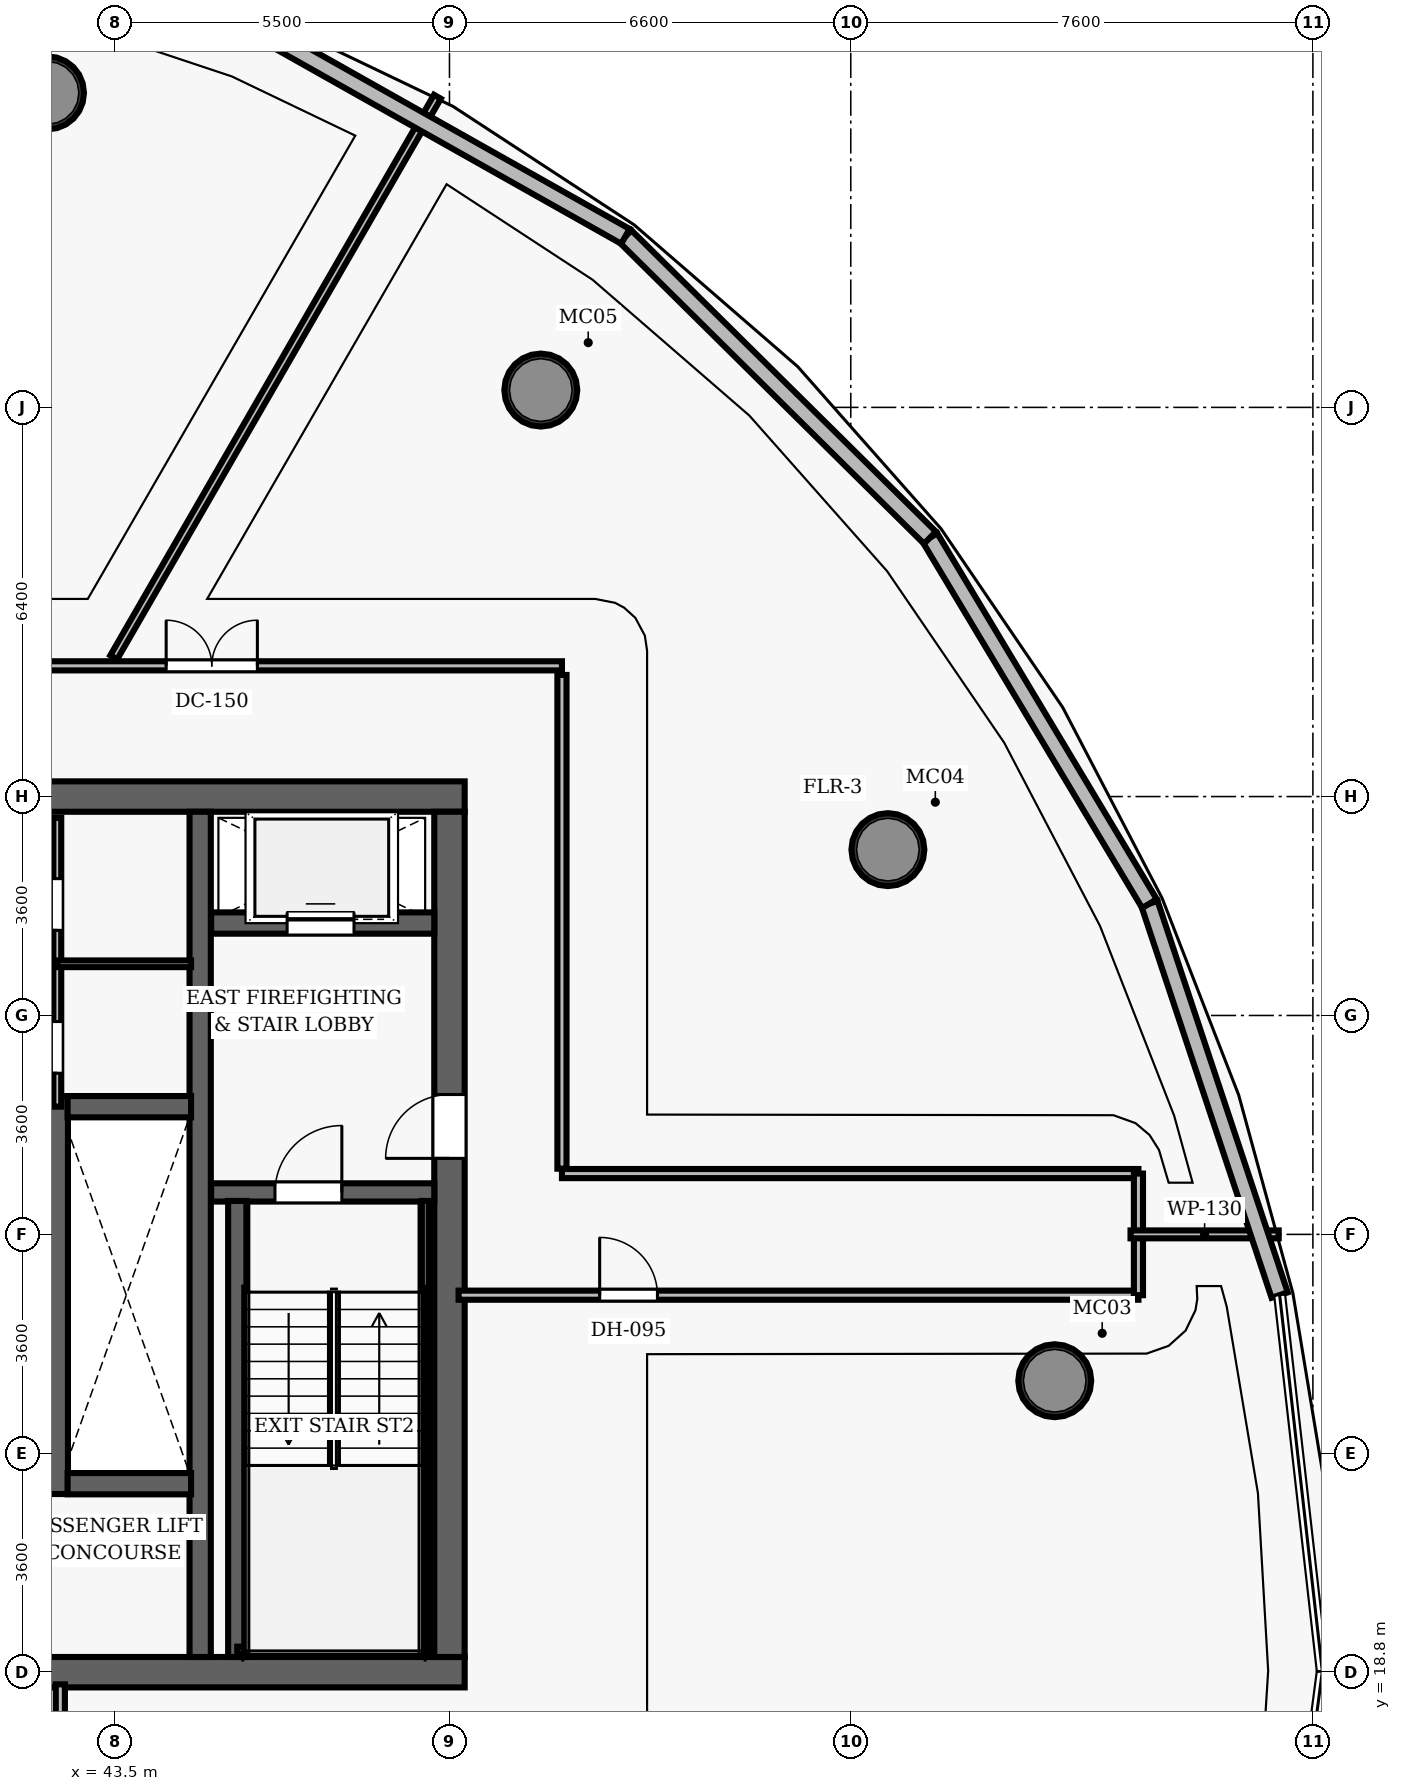
"""IFC4 building model, lengths in metres.
Left out: names, types, materials, properties, quantities, classifications, styles, units other than length and angle.
Written with IfcOpenShell. Run it as: python <this file> out.ifc"""

import sys

from ifc_helpers import new_model, si_unit, direction, frame, frame_2d, origin, origin_2d, place, context, subcontext, project, spatial, rectangle, hollow_circle, extrude, element, fill, save


model = new_model("IFC4")
c1 = context("Model", 3, precision=1e-05, world=origin(), true_north=direction((0.0, 1.0)))
c2 = subcontext(c1, "Body", "Model", "MODEL_VIEW")
j1 = project(units=[si_unit("LENGTHUNIT", "METRE"), si_unit("PLANEANGLEUNIT", "RADIAN")], contexts=[c1])
p1 = place(None, origin())
s1 = spatial("IfcSite", under=j1, at=p1, CompositionType="ELEMENT")
p2 = place(p1, origin())
s2 = spatial("IfcBuilding", under=s1, at=p2, CompositionType="ELEMENT")
p3 = place(p2, frame((0.0, 0.0, 178.9)))
s3 = spatial("IfcBuildingStorey", under=s2, at=p3, CompositionType="ELEMENT", Elevation=178.9)
p4 = place(p3, frame((26.75, 18.8, 0.0), z_axis=(0.0, 0.0, 1.0), x_axis=(1.0, 0.0, 0.0)))
e1 = element("IfcWall", 1, at=p4, inside=s3, PredefinedType="SHEAR", context=c2, shape_type="SweptSolid", body=[
    extrude(rectangle(XDim=22.5, YDim=0.5, at=frame_2d((11.25, 0.0))), origin(), (0.0, 0.0, 1.0), 3.85),
])
p5 = place(p4, frame((14.47, 0.0, 0.0)))
e2 = element("IfcOpeningElement", 2, at=p5, cuts=e1, PredefinedType="OPENING", context=c2, shape_type="SweptSolid", body=[
    extrude(rectangle(XDim=1.05, YDim=2.15, at=frame_2d((0.525, 1.075))), frame((0.0, 0.26, 0.0), z_axis=(0.0, -1.0, 0.0), x_axis=(1.0, 0.0, 0.0)), (0.0, 0.0, 1.0), 0.52),
])
p6 = place(p3, frame((26.75, 33.2, 0.0), z_axis=(0.0, 0.0, 1.0), x_axis=(1.0, 0.0, 0.0)))
e3 = element("IfcWall", 3, at=p6, inside=s3, PredefinedType="SHEAR", context=c2, shape_type="SweptSolid", body=[
    extrude(rectangle(XDim=22.5, YDim=0.5, at=frame_2d((11.25, 0.0))), origin(), (0.0, 0.0, 1.0), 3.85),
])
p7 = place(p6, frame((4.57, 0.0, 0.0)))
e4 = element("IfcOpeningElement", 4, at=p7, cuts=e3, PredefinedType="OPENING", context=c2, shape_type="SweptSolid", body=[
    extrude(rectangle(XDim=1.05, YDim=2.15, at=frame_2d((0.525, 1.075))), frame((0.0, 0.26, 0.0), z_axis=(0.0, -1.0, 0.0), x_axis=(1.0, 0.0, 0.0)), (0.0, 0.0, 1.0), 0.52),
])
p8 = place(p6, frame((14.47, 0.0, 0.0)))
e5 = element("IfcOpeningElement", 5, at=p8, cuts=e3, PredefinedType="OPENING", context=c2, shape_type="SweptSolid", body=[
    extrude(rectangle(XDim=1.05, YDim=2.15, at=frame_2d((0.525, 1.075))), frame((0.0, 0.26, 0.0), z_axis=(0.0, -1.0, 0.0), x_axis=(1.0, 0.0, 0.0)), (0.0, 0.0, 1.0), 0.52),
])
p9 = place(p3, frame((49.0, 19.05, 0.0), z_axis=(0.0, 0.0, 1.0), x_axis=(0.0, 1.0, 0.0)))
e6 = element("IfcWall", 6, at=p9, inside=s3, PredefinedType="SHEAR", context=c2, shape_type="SweptSolid", body=[
    extrude(rectangle(XDim=13.9, YDim=0.5, at=frame_2d((6.95, 0.0))), origin(), (0.0, 0.0, 1.0), 3.85),
])
p10 = place(p9, frame((8.2, 0.0, 0.0)))
e7 = element("IfcOpeningElement", 7, at=p10, cuts=e6, PredefinedType="OPENING", context=c2, shape_type="SweptSolid", body=[
    extrude(rectangle(XDim=1.05, YDim=2.15, at=frame_2d((0.525, 1.075))), frame((0.0, 0.26, 0.0), z_axis=(0.0, -1.0, 0.0), x_axis=(1.0, 0.0, 0.0)), (0.0, 0.0, 1.0), 0.52),
])
p11 = place(p3, frame((44.9, 19.05, 0.0), z_axis=(0.0, 0.0, 1.0), x_axis=(0.0, 1.0, 0.0)))
e8 = element("IfcWall", 8, at=p11, inside=s3, PredefinedType="SHEAR", context=c2, shape_type="SweptSolid", body=[
    extrude(rectangle(XDim=13.9, YDim=0.35, at=frame_2d((6.95, 0.0))), origin(), (0.0, 0.0, 1.0), 3.85),
])
for number, where, z_axis, x_axis in (
    (9, (58.955, 23.594, 0.0), (0.0, 0.0, 1.0), (1.0, 0.0, 0.0)),
    (10, (56.21, 32.327, 0.0), (0.0, 0.0, 1.0), (1.0, 0.0, 0.0)),
    (11, (50.502, 39.885, 0.0), (0.0, 0.0, 1.0), (1.0, 0.0, 0.0)),
    (12, (42.389, 44.772, 0.0), (0.0, 0.0, 1.0), (1.0, 0.0, 0.0)),
):
    element("IfcColumn", number, at=place(p3, frame(where, z_axis=z_axis, x_axis=x_axis)), inside=s3, PredefinedType="COLUMN", context=c2, shape_type="SweptSolid", body=[
        extrude(hollow_circle(Radius=0.6, WallThickness=0.05, at=origin_2d()), origin(), (0.0, 0.0, 1.0), 3.85),
    ])
p12 = place(p3, frame((45.08, 26.69, 0.0), z_axis=(0.0, 0.0, 1.0), x_axis=(1.0, 0.0, 0.0)))
e13 = element("IfcWall", 13, at=p12, inside=s3, PredefinedType="SHEAR", context=c2, shape_type="SweptSolid", body=[
    extrude(rectangle(XDim=3.67, YDim=0.3, at=frame_2d((1.835, 0.0))), origin(), (0.0, 0.0, 1.0), 3.85),
])
p13 = place(p12, frame((1.05, 0.0, 0.0)))
e14 = element("IfcOpeningElement", 14, at=p13, cuts=e13, PredefinedType="OPENING", context=c2, shape_type="SweptSolid", body=[
    extrude(rectangle(XDim=1.1, YDim=2.15, at=frame_2d((0.55, 1.075))), frame((0.0, 0.16, 0.0), z_axis=(0.0, -1.0, 0.0), x_axis=(1.0, 0.0, 0.0)), (0.0, 0.0, 1.0), 0.32),
])
p14 = place(p3, frame((45.51, 19.05, 0.0), z_axis=(0.0, 0.0, 1.0), x_axis=(0.0, 1.0, 0.0)))
e15 = element("IfcWall", 15, at=p14, inside=s3, PredefinedType="SHEAR", context=c2, shape_type="SweptSolid", body=[
    extrude(rectangle(XDim=7.5, YDim=0.3, at=frame_2d((3.75, 0.0))), origin(), (0.0, 0.0, 1.0), 3.85),
])
p15 = place(p3, frame((48.605, 19.1, 0.0), z_axis=(0.0, 0.0, 1.0), x_axis=(0.0, 1.0, 0.0)))
e16 = element("IfcWall", 16, at=p15, inside=s3, PredefinedType="SHEAR", context=c2, shape_type="SweptSolid", body=[
    extrude(rectangle(XDim=7.45, YDim=0.12, at=frame_2d((3.725, 0.0))), origin(), (0.0, 0.0, 1.0), 3.85),
])
p16 = place(p3, frame((45.51, 19.16, 0.0), z_axis=(0.0, 0.0, 1.0), x_axis=(1.0, 0.0, 0.0)))
e17 = element("IfcWall", 17, at=p16, inside=s3, PredefinedType="SHEAR", context=c2, shape_type="SweptSolid", body=[
    extrude(rectangle(XDim=3.095, YDim=0.12, at=frame_2d((1.547, 0.0))), origin(), (0.0, 0.0, 1.0), 3.85),
])
p17 = place(p3, frame((45.08, 31.12, 0.0), z_axis=(0.0, 0.0, 1.0), x_axis=(1.0, 0.0, 0.0)))
e18 = element("IfcWall", 18, at=p17, inside=s3, PredefinedType="SHEAR", context=c2, shape_type="SweptSolid", body=[
    extrude(rectangle(XDim=3.67, YDim=0.35, at=frame_2d((1.835, 0.0))), origin(), (0.0, 0.0, 1.0), 3.035),
])
p18 = place(p17, frame((1.25, 0.0, 0.0)))
e19 = element("IfcOpeningElement", 19, at=p18, cuts=e18, PredefinedType="OPENING", context=c2, shape_type="SweptSolid", body=[
    extrude(rectangle(XDim=1.1, YDim=2.15, at=frame_2d((0.55, 1.075))), frame((0.0, 0.185, 0.0), z_axis=(0.0, -1.0, 0.0), x_axis=(1.0, 0.0, 0.0)), (0.0, 0.0, 1.0), 0.37),
])
p19 = place(p3, frame((42.55, 21.73, 0.0), z_axis=(0.0, 0.0, 1.0), x_axis=(0.0, 1.0, 0.0)))
e20 = element("IfcWall", 20, at=p19, inside=s3, PredefinedType="SHEAR", context=c2, shape_type="SweptSolid", body=[
    extrude(rectangle(XDim=6.54, YDim=0.35, at=frame_2d((3.27, 0.0))), origin(), (0.0, 0.0, 1.0), 3.035),
])
for number, where, z_axis, x_axis in (
    (21, (42.72, 21.9, 0.0), (0.0, 0.0, 1.0), (1.0, 0.0, 0.0)),
    (22, (42.72, 28.1, 0.0), (0.0, 0.0, 1.0), (1.0, 0.0, 0.0)),
):
    element("IfcWall", number, at=place(p3, frame(where, z_axis=z_axis, x_axis=x_axis)), inside=s3, PredefinedType="SHEAR", context=c2, shape_type="SweptSolid", body=[
        extrude(rectangle(XDim=2.03, YDim=0.35, at=frame_2d((1.015, 0.0))), origin(), (0.0, 0.0, 1.0), 3.035),
    ])
p20 = place(p3, frame((42.55, 28.1, 0.0), z_axis=(0.0, 0.0, 1.0), x_axis=(0.0, 1.0, 0.0)))
e23 = element("IfcWall", 23, at=p20, inside=s3, PredefinedType="PARTITIONING", context=c2, shape_type="SweptSolid", body=[
    extrude(rectangle(XDim=4.75, YDim=0.13, at=frame_2d((2.375, 0.0))), origin(), (0.0, 0.0, 1.0), 3.035),
])
p21 = place(p20, frame((0.55, 0.0, 0.0)))
e24 = element("IfcOpeningElement", 24, at=p21, cuts=e23, PredefinedType="OPENING", context=c2, shape_type="SweptSolid", body=[
    extrude(rectangle(XDim=0.85, YDim=2.1, at=frame_2d((0.425, 1.05))), frame((0.0, 0.075, 0.0), z_axis=(0.0, -1.0, 0.0), x_axis=(1.0, 0.0, 0.0)), (0.0, 0.0, 1.0), 0.15),
])
p22 = place(p20, frame((2.9, 0.0, 0.0)))
e25 = element("IfcOpeningElement", 25, at=p22, cuts=e23, PredefinedType="OPENING", context=c2, shape_type="SweptSolid", body=[
    extrude(rectangle(XDim=0.85, YDim=2.1, at=frame_2d((0.425, 1.05))), frame((0.0, 0.075, 0.0), z_axis=(0.0, -1.0, 0.0), x_axis=(1.0, 0.0, 0.0)), (0.0, 0.0, 1.0), 0.15),
])
p23 = place(p3, frame((42.55, 30.45, 0.0), z_axis=(0.0, 0.0, 1.0), x_axis=(1.0, 0.0, 0.0)))
e26 = element("IfcWall", 26, at=p23, inside=s3, PredefinedType="PARTITIONING", context=c2, shape_type="SweptSolid", body=[
    extrude(rectangle(XDim=2.2, YDim=0.11, at=frame_2d((1.1, 0.0))), origin(), (0.0, 0.0, 1.0), 3.035),
])
p24 = place(p3, frame((24.85, 35.35, 0.0), z_axis=(0.0, 0.0, 1.0), x_axis=(1.0, 0.0, 0.0)))
e27 = element("IfcWall", 27, at=p24, inside=s3, PredefinedType="PARTITIONING", context=c2, shape_type="SweptSolid", body=[
    extrude(rectangle(XDim=26.0, YDim=0.15, at=frame_2d((13.0, 0.0))), origin(), (0.0, 0.0, 1.0), 3.035),
])
p25 = place(p24, frame((19.491, 0.0, 0.0)))
e28 = element("IfcOpeningElement", 28, at=p25, cuts=e27, PredefinedType="OPENING", context=c2, shape_type="SweptSolid", body=[
    extrude(rectangle(XDim=1.5, YDim=2.2, at=frame_2d((0.75, 1.1))), frame((0.0, 0.085, 0.0), z_axis=(0.0, -1.0, 0.0), x_axis=(1.0, 0.0, 0.0)), (0.0, 0.0, 1.0), 0.17),
])
p26 = place(p24, frame((9.516, 0.0, 0.0)))
e29 = element("IfcOpeningElement", 29, at=p26, cuts=e27, PredefinedType="OPENING", context=c2, shape_type="SweptSolid", body=[
    extrude(rectangle(XDim=1.5, YDim=2.2, at=frame_2d((0.75, 1.1))), frame((0.0, 0.085, 0.0), z_axis=(0.0, -1.0, 0.0), x_axis=(1.0, 0.0, 0.0)), (0.0, 0.0, 1.0), 0.17),
])
p27 = place(p24, frame((5.234, 0.0, 0.0)))
e30 = element("IfcOpeningElement", 30, at=p27, cuts=e27, PredefinedType="OPENING", context=c2, shape_type="SweptSolid", body=[
    extrude(rectangle(XDim=1.5, YDim=2.2, at=frame_2d((0.75, 1.1))), frame((0.0, 0.085, 0.0), z_axis=(0.0, -1.0, 0.0), x_axis=(1.0, 0.0, 0.0)), (0.0, 0.0, 1.0), 0.17),
])
p28 = place(p3, frame((50.85, 27.08, 0.0), z_axis=(0.0, 0.0, 1.0), x_axis=(0.0, 1.0, 0.0)))
e31 = element("IfcWall", 31, at=p28, inside=s3, PredefinedType="PARTITIONING", context=c2, shape_type="SweptSolid", body=[
    extrude(rectangle(XDim=8.12, YDim=0.15, at=frame_2d((4.06, 0.0))), origin(), (0.0, 0.0, 1.0), 3.035),
])
p29 = place(p3, frame((50.85, 27.0, 0.0), z_axis=(0.0, 0.0, 1.0), x_axis=(1.0, 0.0, 0.0)))
e32 = element("IfcWall", 32, at=p29, inside=s3, PredefinedType="PARTITIONING", context=c2, shape_type="SweptSolid", body=[
    extrude(rectangle(XDim=9.481, YDim=0.15, at=frame_2d((4.74, 0.0))), origin(), (0.0, 0.0, 1.0), 3.035),
])
p30 = place(p3, frame((49.15, 25.0, 0.0), z_axis=(0.0, 0.0, 1.0), x_axis=(1.0, 0.0, 0.0)))
e33 = element("IfcWall", 33, at=p30, inside=s3, PredefinedType="PARTITIONING", context=c2, shape_type="SweptSolid", body=[
    extrude(rectangle(XDim=11.181, YDim=0.15, at=frame_2d((5.591, 0.0))), origin(), (0.0, 0.0, 1.0), 3.035),
])
p31 = place(p30, frame((2.32, 0.0, 0.0)))
e34 = element("IfcOpeningElement", 34, at=p31, cuts=e33, PredefinedType="OPENING", context=c2, shape_type="SweptSolid", body=[
    extrude(rectangle(XDim=0.95, YDim=2.15, at=frame_2d((0.475, 1.075))), frame((0.0, 0.085, 0.0), z_axis=(0.0, -1.0, 0.0), x_axis=(1.0, 0.0, 0.0)), (0.0, 0.0, 1.0), 0.17),
])
p32 = place(p3, frame((60.331, 25.0, 0.0), z_axis=(0.0, 0.0, 1.0), x_axis=(0.0, 1.0, 0.0)))
e35 = element("IfcWall", 35, at=p32, inside=s3, PredefinedType="PARTITIONING", context=c2, shape_type="SweptSolid", body=[
    extrude(rectangle(XDim=2.0, YDim=0.15, at=frame_2d((1.0, 0.0))), origin(), (0.0, 0.0, 1.0), 3.035),
])
p33 = place(p3, frame((42.6, 16.65, 0.0), z_axis=(0.0, 0.0, 1.0), x_axis=(0.0, 1.0, 0.0)))
e36 = element("IfcWall", 36, at=p33, inside=s3, PredefinedType="PARTITIONING", context=c2, shape_type="SweptSolid", body=[
    extrude(rectangle(XDim=1.95, YDim=0.15, at=frame_2d((0.975, 0.0))), origin(), (0.0, 0.0, 1.0), 3.035),
])
p34 = place(p3, frame((60.201, 26.0, 0.0), z_axis=(0.0, 0.0, 1.0), x_axis=(1.0, 0.0, 0.0)))
e37 = element("IfcWall", 37, at=p34, inside=s3, PredefinedType="PARTITIONING", context=c2, shape_type="SweptSolid", body=[
    extrude(rectangle(XDim=2.437, YDim=0.13, at=frame_2d((1.219, 0.0))), origin(), (0.0, 0.0, 1.0), 3.035),
])
p35 = place(p3, frame((43.479, 35.49, 0.0), z_axis=(0.0, 0.0, 1.0), x_axis=(0.500004366266, 0.866022882905, 0.0)))
e38 = element("IfcWall", 38, at=p35, inside=s3, PredefinedType="PARTITIONING", context=c2, shape_type="SweptSolid", body=[
    extrude(rectangle(XDim=10.645, YDim=0.13, at=frame_2d((5.323, 0.0))), origin(), (0.0, 0.0, 1.0), 3.035),
])
p36 = place(p3, frame((60.512, 31.439, 0.0), z_axis=(0.0, 0.0, 1.0), x_axis=(0.315590755591, -0.948895397283, 0.0)))
e39 = element("IfcWall", 39, at=p36, inside=s3, PredefinedType="SOLIDWALL", context=c2, shape_type="SweptSolid", body=[
    extrude(rectangle(XDim=6.784, YDim=0.28, at=frame_2d((3.392, 0.0))), origin(), (0.0, 0.0, 1.0), 3.62),
])
p37 = place(p3, frame((56.902, 37.457, 0.0), z_axis=(0.0, 0.0, 1.0), x_axis=(0.514434360632, -0.857529759601, 0.0)))
e40 = element("IfcWall", 40, at=p37, inside=s3, PredefinedType="SOLIDWALL", context=c2, shape_type="SweptSolid", body=[
    extrude(rectangle(XDim=7.018, YDim=0.28, at=frame_2d((3.509, 0.0))), origin(), (0.0, 0.0, 1.0), 3.62),
])
p38 = place(p3, frame((51.894, 42.413, 0.0), z_axis=(0.0, 0.0, 1.0), x_axis=(0.710873697504, -0.703319689897, 0.0)))
e41 = element("IfcWall", 41, at=p38, inside=s3, PredefinedType="SOLIDWALL", context=c2, shape_type="SweptSolid", body=[
    extrude(rectangle(XDim=7.046, YDim=0.28, at=frame_2d((3.523, 0.0))), origin(), (0.0, 0.0, 1.0), 3.62),
])
p39 = place(p3, frame((45.756, 45.872, 0.0), z_axis=(0.0, 0.0, 1.0), x_axis=(0.87116433645, -0.490991546665, 0.0)))
e42 = element("IfcWall", 42, at=p39, inside=s3, PredefinedType="SOLIDWALL", context=c2, shape_type="SweptSolid", body=[
    extrude(rectangle(XDim=7.045, YDim=0.28, at=frame_2d((3.523, 0.0))), origin(), (0.0, 0.0, 1.0), 3.62),
])
p40 = place(p13, origin())
e43 = element("IfcDoor", 43, at=p40, inside=s3, OperationType="SINGLE_SWING_RIGHT", PredefinedType="DOOR", context=c2, shape_type="SweptSolid", body=[
    extrude(rectangle(XDim=1.1, YDim=2.15, at=frame_2d((0.55, 1.075))), frame((0.0, 0.025, 0.0), z_axis=(0.0, -1.0, 0.0), x_axis=(1.0, 0.0, 0.0)), (0.0, 0.0, 1.0), 0.05),
])
fill(e14, e43)
p41 = place(p10, origin())
e44 = element("IfcDoor", 44, at=p41, inside=s3, OperationType="SINGLE_SWING_LEFT", PredefinedType="DOOR", context=c2, shape_type="SweptSolid", body=[
    extrude(rectangle(XDim=1.05, YDim=2.15, at=frame_2d((0.525, 1.075))), frame((0.0, 0.025, 0.0), z_axis=(0.0, -1.0, 0.0), x_axis=(1.0, 0.0, 0.0)), (0.0, 0.0, 1.0), 0.05),
])
fill(e7, e44)
p42 = place(p21, origin())
e45 = element("IfcDoor", 45, at=p42, inside=s3, OperationType="SINGLE_SWING_LEFT", PredefinedType="DOOR", context=c2, shape_type="SweptSolid", body=[
    extrude(rectangle(XDim=0.85, YDim=2.1, at=frame_2d((0.425, 1.05))), frame((0.0, 0.025, 0.0), z_axis=(0.0, -1.0, 0.0), x_axis=(1.0, 0.0, 0.0)), (0.0, 0.0, 1.0), 0.05),
])
fill(e24, e45)
p43 = place(p22, origin())
e46 = element("IfcDoor", 46, at=p43, inside=s3, OperationType="SINGLE_SWING_LEFT", PredefinedType="DOOR", context=c2, shape_type="SweptSolid", body=[
    extrude(rectangle(XDim=0.85, YDim=2.1, at=frame_2d((0.425, 1.05))), frame((0.0, 0.025, 0.0), z_axis=(0.0, -1.0, 0.0), x_axis=(1.0, 0.0, 0.0)), (0.0, 0.0, 1.0), 0.05),
])
fill(e25, e46)
p44 = place(p25, origin())
e47 = element("IfcDoor", 47, at=p44, inside=s3, OperationType="DOUBLE_DOOR_SINGLE_SWING", PredefinedType="DOOR", context=c2, shape_type="SweptSolid", body=[
    extrude(rectangle(XDim=1.5, YDim=2.2, at=frame_2d((0.75, 1.1))), frame((0.0, 0.025, 0.0), z_axis=(0.0, -1.0, 0.0), x_axis=(1.0, 0.0, 0.0)), (0.0, 0.0, 1.0), 0.05),
])
fill(e28, e47)
p45 = place(p31, origin())
e48 = element("IfcDoor", 48, at=p45, inside=s3, OperationType="SINGLE_SWING_LEFT", PredefinedType="DOOR", context=c2, shape_type="SweptSolid", body=[
    extrude(rectangle(XDim=0.95, YDim=2.15, at=frame_2d((0.475, 1.075))), frame((0.0, 0.025, 0.0), z_axis=(0.0, -1.0, 0.0), x_axis=(1.0, 0.0, 0.0)), (0.0, 0.0, 1.0), 0.05),
])
fill(e34, e48)
p46 = place(p18, origin())
e49 = element("IfcDoor", 49, at=p46, inside=s3, OperationType="SLIDING_TO_LEFT", PredefinedType="DOOR", context=c2, shape_type="SweptSolid", body=[
    extrude(rectangle(XDim=1.1, YDim=2.15, at=frame_2d((0.55, 1.075))), frame((0.0, 0.025, 0.0), z_axis=(0.0, -1.0, 0.0), x_axis=(1.0, 0.0, 0.0)), (0.0, 0.0, 1.0), 0.05),
])
fill(e19, e49)
save(model, sys.argv[1])
